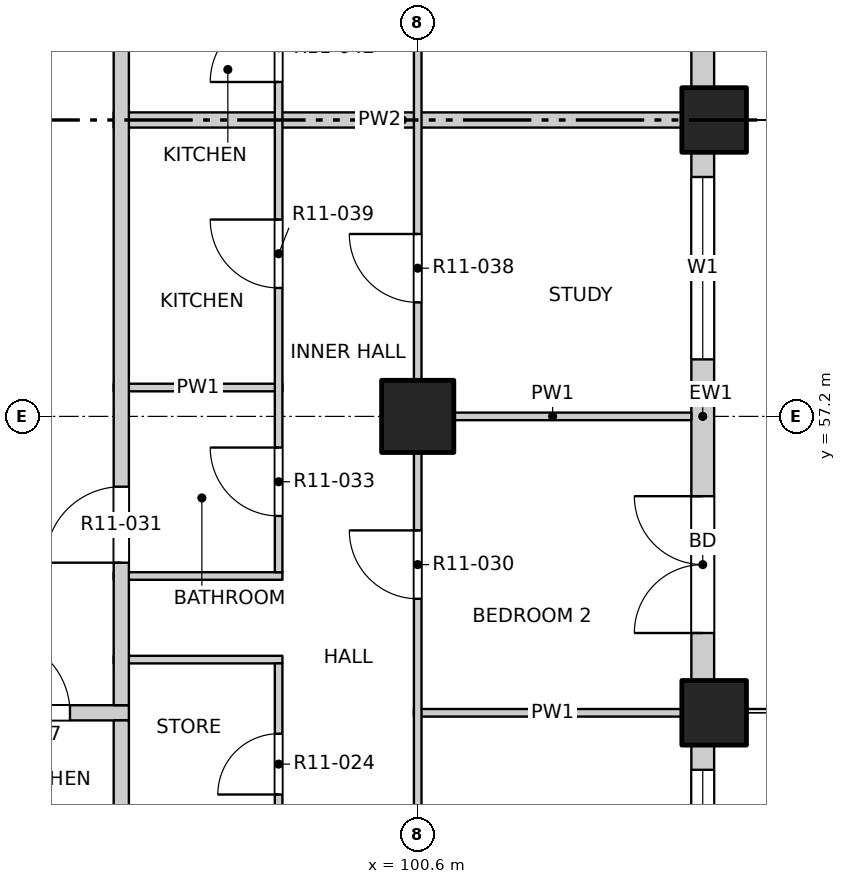
"""IFC4 building model, lengths in metres.
Left out: names, types, materials, properties, quantities, classifications, styles, units other than length and angle.
Written with IfcOpenShell. Run it as: python <this file> out.ifc"""

import sys

from ifc_helpers import new_model, si_unit, direction, frame, frame_2d, origin, origin_2d, place, context, subcontext, project, spatial, rectangle, extrude, element, fill, save


model = new_model("IFC4")
c1 = context("Model", 3, precision=1e-05, world=origin(), true_north=direction((0.0, 1.0)))
c2 = subcontext(c1, "Body", "Model", "MODEL_VIEW")
j1 = project(units=[si_unit("LENGTHUNIT", "METRE"), si_unit("PLANEANGLEUNIT", "RADIAN")], contexts=[c1])
p1 = place(None, origin())
s1 = spatial("IfcSite", under=j1, at=p1, CompositionType="ELEMENT")
p2 = place(p1, origin())
s2 = spatial("IfcBuilding", under=s1, at=p2, CompositionType="ELEMENT")
p3 = place(p2, frame((0.0, 0.0, 130.5)))
s3 = spatial("IfcBuildingStorey", under=s2, at=p3, CompositionType="ELEMENT", Elevation=130.5)
for number, where, z_axis, x_axis in (
    (1, (104.5, 53.3, -0.25), (0.0, 0.0, 1.0), (1.0, 0.0, 0.0)),
    (2, (104.5, 61.1, -0.25), (0.0, 0.0, 1.0), (1.0, 0.0, 0.0)),
):
    element("IfcColumn", number, at=place(p3, frame(where, z_axis=z_axis, x_axis=x_axis)), inside=s3, PredefinedType="COLUMN", context=c2, shape_type="SweptSolid", body=[
        extrude(rectangle(XDim=0.85, YDim=0.85, at=origin_2d()), origin(), (0.0, 0.0, 1.0), 3.4),
    ])
p4 = place(p3, frame((100.6, 57.2, -0.25), z_axis=(0.0, 0.0, 1.0), x_axis=(1.0, 0.0, 0.0)))
e3 = element("IfcColumn", 3, at=p4, inside=s3, PredefinedType="COLUMN", context=c2, shape_type="SweptSolid", body=[
    extrude(rectangle(XDim=0.95, YDim=0.95, at=origin_2d()), origin(), (0.0, 0.0, 1.0), 3.4),
])
p5 = place(p3, frame((104.35, 49.4, 0.0), z_axis=(0.0, 0.0, 1.0), x_axis=(0.0, 1.0, 0.0)))
e4 = element("IfcWall", 4, at=p5, inside=s3, PredefinedType="SOLIDWALL", context=c2, shape_type="SweptSolid", body=[
    extrude(rectangle(XDim=3.475, YDim=0.3, at=frame_2d((1.738, 0.0))), origin(), (0.0, 0.0, 1.0), 2.7),
])
p6 = place(p5, frame((0.75, 0.0, 0.9)))
e5 = element("IfcOpeningElement", 5, at=p6, cuts=e4, PredefinedType="OPENING", context=c2, shape_type="SweptSolid", body=[
    extrude(rectangle(XDim=2.4, YDim=1.8, at=frame_2d((1.2, 0.9))), frame((0.0, 0.16, 0.0), z_axis=(0.0, -1.0, 0.0), x_axis=(1.0, 0.0, 0.0)), (0.0, 0.0, 1.0), 0.32),
])
p7 = place(p3, frame((104.35, 53.725, 0.0), z_axis=(0.0, 0.0, 1.0), x_axis=(0.0, 1.0, 0.0)))
e6 = element("IfcWall", 6, at=p7, inside=s3, PredefinedType="SOLIDWALL", context=c2, shape_type="SweptSolid", body=[
    extrude(rectangle(XDim=6.95, YDim=0.3, at=frame_2d((3.475, 0.0))), origin(), (0.0, 0.0, 1.0), 2.7),
])
p8 = place(p7, frame((0.625, 0.0, 0.0)))
e7 = element("IfcOpeningElement", 7, at=p8, cuts=e6, PredefinedType="OPENING", context=c2, shape_type="SweptSolid", body=[
    extrude(rectangle(XDim=1.8, YDim=2.4, at=frame_2d((0.9, 1.2))), frame((0.0, 0.16, 0.0), z_axis=(0.0, -1.0, 0.0), x_axis=(1.0, 0.0, 0.0)), (0.0, 0.0, 1.0), 0.32),
])
p9 = place(p7, frame((4.225, 0.0, 0.9)))
e8 = element("IfcOpeningElement", 8, at=p9, cuts=e6, PredefinedType="OPENING", context=c2, shape_type="SweptSolid", body=[
    extrude(rectangle(XDim=2.4, YDim=1.8, at=frame_2d((1.2, 0.9))), frame((0.0, 0.16, 0.0), z_axis=(0.0, -1.0, 0.0), x_axis=(1.0, 0.0, 0.0)), (0.0, 0.0, 1.0), 0.32),
])
p10 = place(p3, frame((104.35, 61.525, 0.0), z_axis=(0.0, 0.0, 1.0), x_axis=(0.0, 1.0, 0.0)))
e9 = element("IfcWall", 9, at=p10, inside=s3, PredefinedType="SOLIDWALL", context=c2, shape_type="SweptSolid", body=[
    extrude(rectangle(XDim=6.95, YDim=0.3, at=frame_2d((3.475, 0.0))), origin(), (0.0, 0.0, 1.0), 2.7),
])
p11 = place(p10, frame((0.625, 0.0, 0.0)))
e10 = element("IfcOpeningElement", 10, at=p11, cuts=e9, PredefinedType="OPENING", context=c2, shape_type="SweptSolid", body=[
    extrude(rectangle(XDim=1.8, YDim=2.4, at=frame_2d((0.9, 1.2))), frame((0.0, 0.16, 0.0), z_axis=(0.0, -1.0, 0.0), x_axis=(1.0, 0.0, 0.0)), (0.0, 0.0, 1.0), 0.32),
])
p12 = place(p10, frame((4.225, 0.0, 0.9)))
e11 = element("IfcOpeningElement", 11, at=p12, cuts=e9, PredefinedType="OPENING", context=c2, shape_type="SweptSolid", body=[
    extrude(rectangle(XDim=2.4, YDim=1.8, at=frame_2d((1.2, 0.9))), frame((0.0, 0.16, 0.0), z_axis=(0.0, -1.0, 0.0), x_axis=(1.0, 0.0, 0.0)), (0.0, 0.0, 1.0), 0.32),
])
p13 = place(p3, frame((73.2, 53.3, 0.0), z_axis=(0.0, 0.0, 1.0), x_axis=(1.0, 0.0, 0.0)))
e12 = element("IfcWall", 12, at=p13, inside=s3, PredefinedType="PARTITIONING", context=c2, shape_type="SweptSolid", body=[
    extrude(rectangle(XDim=23.6, YDim=0.2, at=frame_2d((11.8, 0.0))), origin(), (0.0, 0.0, 1.0), 3.15),
])
p14 = place(p13, frame((6.775, 0.0, 0.0)))
e13 = element("IfcOpeningElement", 13, at=p14, cuts=e12, PredefinedType="OPENING", context=c2, shape_type="SweptSolid", body=[
    extrude(rectangle(XDim=1.0, YDim=2.1, at=frame_2d((0.5, 1.05))), frame((0.0, 0.11, 0.0), z_axis=(0.0, -1.0, 0.0), x_axis=(1.0, 0.0, 0.0)), (0.0, 0.0, 1.0), 0.22),
])
p15 = place(p13, frame((21.825, 0.0, 0.0)))
e14 = element("IfcOpeningElement", 14, at=p15, cuts=e12, PredefinedType="OPENING", context=c2, shape_type="SweptSolid", body=[
    extrude(rectangle(XDim=1.0, YDim=2.1, at=frame_2d((0.5, 1.05))), frame((0.0, 0.11, 0.0), z_axis=(0.0, -1.0, 0.0), x_axis=(1.0, 0.0, 0.0)), (0.0, 0.0, 1.0), 0.22),
])
p16 = place(p3, frame((100.55, 53.3, 0.0), z_axis=(0.0, 0.0, 1.0), x_axis=(1.0, 0.0, 0.0)))
e15 = element("IfcWall", 15, at=p16, inside=s3, PredefinedType="PARTITIONING", context=c2, shape_type="SweptSolid", body=[
    extrude(rectangle(XDim=3.65, YDim=0.1, at=frame_2d((1.825, 0.0))), origin(), (0.0, 0.0, 1.0), 3.15),
])
for number, where, z_axis, x_axis in (
    (16, (96.6, 54.0, 0.0), (0.0, 0.0, 1.0), (1.0, 0.0, 0.0)),
    (17, (96.6, 55.1, 0.0), (0.0, 0.0, 1.0), (1.0, 0.0, 0.0)),
):
    element("IfcWall", number, at=place(p3, frame(where, z_axis=z_axis, x_axis=x_axis)), inside=s3, PredefinedType="PARTITIONING", context=c2, shape_type="SweptSolid", body=[
        extrude(rectangle(XDim=2.22, YDim=0.1, at=frame_2d((1.11, 0.0))), origin(), (0.0, 0.0, 1.0), 3.15),
    ])
p17 = place(p3, frame((100.55, 57.2, 0.0), z_axis=(0.0, 0.0, 1.0), x_axis=(1.0, 0.0, 0.0)))
e18 = element("IfcWall", 18, at=p17, inside=s3, PredefinedType="PARTITIONING", context=c2, shape_type="SweptSolid", body=[
    extrude(rectangle(XDim=3.65, YDim=0.1, at=frame_2d((1.825, 0.0))), origin(), (0.0, 0.0, 1.0), 3.15),
])
p18 = place(p3, frame((96.6, 57.58, 0.0), z_axis=(0.0, 0.0, 1.0), x_axis=(1.0, 0.0, 0.0)))
e19 = element("IfcWall", 19, at=p18, inside=s3, PredefinedType="PARTITIONING", context=c2, shape_type="SweptSolid", body=[
    extrude(rectangle(XDim=2.22, YDim=0.1, at=frame_2d((1.11, 0.0))), origin(), (0.0, 0.0, 1.0), 3.15),
])
p19 = place(p3, frame((96.6, 61.1, 0.0), z_axis=(0.0, 0.0, 1.0), x_axis=(1.0, 0.0, 0.0)))
e20 = element("IfcWall", 20, at=p19, inside=s3, PredefinedType="PARTITIONING", context=c2, shape_type="SweptSolid", body=[
    extrude(rectangle(XDim=7.6, YDim=0.2, at=frame_2d((3.8, 0.0))), origin(), (0.0, 0.0, 1.0), 2.55),
])
p20 = place(p3, frame((96.7, 45.8, 0.0), z_axis=(0.0, 0.0, 1.0), x_axis=(0.0, 1.0, 0.0)))
e21 = element("IfcWall", 21, at=p20, inside=s3, PredefinedType="PARTITIONING", context=c2, shape_type="SweptSolid", body=[
    extrude(rectangle(XDim=7.4, YDim=0.2, at=frame_2d((3.7, 0.0))), origin(), (0.0, 0.0, 1.0), 3.15),
])
p21 = place(p3, frame((96.7, 53.4, 0.0), z_axis=(0.0, 0.0, 1.0), x_axis=(0.0, 1.0, 0.0)))
e22 = element("IfcWall", 22, at=p21, inside=s3, PredefinedType="PARTITIONING", context=c2, shape_type="SweptSolid", body=[
    extrude(rectangle(XDim=30.8, YDim=0.2, at=frame_2d((15.4, 0.0))), origin(), (0.0, 0.0, 1.0), 3.15),
])
p22 = place(p21, frame((1.875, 0.0, 0.0)))
e23 = element("IfcOpeningElement", 23, at=p22, cuts=e22, PredefinedType="OPENING", context=c2, shape_type="SweptSolid", body=[
    extrude(rectangle(XDim=1.0, YDim=2.1, at=frame_2d((0.5, 1.05))), frame((0.0, 0.11, 0.0), z_axis=(0.0, -1.0, 0.0), x_axis=(1.0, 0.0, 0.0)), (0.0, 0.0, 1.0), 0.22),
])
p23 = place(p21, frame((10.875, 0.0, 0.0)))
e24 = element("IfcOpeningElement", 24, at=p23, cuts=e22, PredefinedType="OPENING", context=c2, shape_type="SweptSolid", body=[
    extrude(rectangle(XDim=1.0, YDim=2.1, at=frame_2d((0.5, 1.05))), frame((0.0, 0.11, 0.0), z_axis=(0.0, -1.0, 0.0), x_axis=(1.0, 0.0, 0.0)), (0.0, 0.0, 1.0), 0.22),
])
p24 = place(p21, frame((25.725, 0.0, 0.0)))
e25 = element("IfcOpeningElement", 25, at=p24, cuts=e22, PredefinedType="OPENING", context=c2, shape_type="SweptSolid", body=[
    extrude(rectangle(XDim=1.0, YDim=2.1, at=frame_2d((0.5, 1.05))), frame((0.0, 0.11, 0.0), z_axis=(0.0, -1.0, 0.0), x_axis=(1.0, 0.0, 0.0)), (0.0, 0.0, 1.0), 0.22),
])
p25 = place(p3, frame((98.77, 49.45, 0.0), z_axis=(0.0, 0.0, 1.0), x_axis=(0.0, 1.0, 0.0)))
e26 = element("IfcWall", 26, at=p25, inside=s3, PredefinedType="PARTITIONING", context=c2, shape_type="SweptSolid", body=[
    extrude(rectangle(XDim=4.5, YDim=0.1, at=frame_2d((2.25, 0.0))), origin(), (0.0, 0.0, 1.0), 3.15),
])
p26 = place(p25, frame((0.425, 0.0, 0.0)))
e27 = element("IfcOpeningElement", 27, at=p26, cuts=e26, PredefinedType="OPENING", context=c2, shape_type="SweptSolid", body=[
    extrude(rectangle(XDim=0.9, YDim=2.1, at=frame_2d((0.45, 1.05))), frame((0.0, 0.06, 0.0), z_axis=(0.0, -1.0, 0.0), x_axis=(1.0, 0.0, 0.0)), (0.0, 0.0, 1.0), 0.12),
])
p27 = place(p25, frame((2.775, 0.0, 0.0)))
e28 = element("IfcOpeningElement", 28, at=p27, cuts=e26, PredefinedType="OPENING", context=c2, shape_type="SweptSolid", body=[
    extrude(rectangle(XDim=0.8, YDim=2.1, at=frame_2d((0.4, 1.05))), frame((0.0, 0.06, 0.0), z_axis=(0.0, -1.0, 0.0), x_axis=(1.0, 0.0, 0.0)), (0.0, 0.0, 1.0), 0.12),
])
p28 = place(p3, frame((98.77, 55.15, 0.0), z_axis=(0.0, 0.0, 1.0), x_axis=(0.0, 1.0, 0.0)))
e29 = element("IfcWall", 29, at=p28, inside=s3, PredefinedType="PARTITIONING", context=c2, shape_type="SweptSolid", body=[
    extrude(rectangle(XDim=7.8, YDim=0.1, at=frame_2d((3.9, 0.0))), origin(), (0.0, 0.0, 1.0), 3.15),
])
p29 = place(p28, frame((0.74, 0.0, 0.0)))
e30 = element("IfcOpeningElement", 30, at=p29, cuts=e29, PredefinedType="OPENING", context=c2, shape_type="SweptSolid", body=[
    extrude(rectangle(XDim=0.9, YDim=2.1, at=frame_2d((0.45, 1.05))), frame((0.0, 0.06, 0.0), z_axis=(0.0, -1.0, 0.0), x_axis=(1.0, 0.0, 0.0)), (0.0, 0.0, 1.0), 0.12),
])
p30 = place(p28, frame((3.74, 0.0, 0.0)))
e31 = element("IfcOpeningElement", 31, at=p30, cuts=e29, PredefinedType="OPENING", context=c2, shape_type="SweptSolid", body=[
    extrude(rectangle(XDim=0.9, YDim=2.1, at=frame_2d((0.45, 1.05))), frame((0.0, 0.06, 0.0), z_axis=(0.0, -1.0, 0.0), x_axis=(1.0, 0.0, 0.0)), (0.0, 0.0, 1.0), 0.12),
])
p31 = place(p28, frame((6.45, 0.0, 0.0)))
e32 = element("IfcOpeningElement", 32, at=p31, cuts=e29, PredefinedType="OPENING", context=c2, shape_type="SweptSolid", body=[
    extrude(rectangle(XDim=0.9, YDim=2.1, at=frame_2d((0.45, 1.05))), frame((0.0, 0.06, 0.0), z_axis=(0.0, -1.0, 0.0), x_axis=(1.0, 0.0, 0.0)), (0.0, 0.0, 1.0), 0.12),
])
p32 = place(p3, frame((100.6, 45.8, 0.0), z_axis=(0.0, 0.0, 1.0), x_axis=(0.0, 1.0, 0.0)))
e33 = element("IfcWall", 33, at=p32, inside=s3, PredefinedType="PARTITIONING", context=c2, shape_type="SweptSolid", body=[
    extrude(rectangle(XDim=38.4, YDim=0.1, at=frame_2d((19.2, 0.0))), origin(), (0.0, 0.0, 1.0), 3.15),
])
p33 = place(p32, frame((1.05, 0.0, 0.0)))
e34 = element("IfcOpeningElement", 34, at=p33, cuts=e33, PredefinedType="OPENING", context=c2, shape_type="SweptSolid", body=[
    extrude(rectangle(XDim=1.2, YDim=2.1, at=frame_2d((0.6, 1.05))), frame((0.0, 0.06, 0.0), z_axis=(0.0, -1.0, 0.0), x_axis=(1.0, 0.0, 0.0)), (0.0, 0.0, 1.0), 0.12),
])
p34 = place(p32, frame((5.1, 0.0, 0.0)))
e35 = element("IfcOpeningElement", 35, at=p34, cuts=e33, PredefinedType="OPENING", context=c2, shape_type="SweptSolid", body=[
    extrude(rectangle(XDim=0.9, YDim=2.1, at=frame_2d((0.45, 1.05))), frame((0.0, 0.06, 0.0), z_axis=(0.0, -1.0, 0.0), x_axis=(1.0, 0.0, 0.0)), (0.0, 0.0, 1.0), 0.12),
])
p35 = place(p32, frame((9.0, 0.0, 0.0)))
e36 = element("IfcOpeningElement", 36, at=p35, cuts=e33, PredefinedType="OPENING", context=c2, shape_type="SweptSolid", body=[
    extrude(rectangle(XDim=0.9, YDim=2.1, at=frame_2d((0.45, 1.05))), frame((0.0, 0.06, 0.0), z_axis=(0.0, -1.0, 0.0), x_axis=(1.0, 0.0, 0.0)), (0.0, 0.0, 1.0), 0.12),
])
p36 = place(p32, frame((12.9, 0.0, 0.0)))
e37 = element("IfcOpeningElement", 37, at=p36, cuts=e33, PredefinedType="OPENING", context=c2, shape_type="SweptSolid", body=[
    extrude(rectangle(XDim=0.9, YDim=2.1, at=frame_2d((0.45, 1.05))), frame((0.0, 0.06, 0.0), z_axis=(0.0, -1.0, 0.0), x_axis=(1.0, 0.0, 0.0)), (0.0, 0.0, 1.0), 0.12),
])
p37 = place(p32, frame((16.8, 0.0, 0.0)))
e38 = element("IfcOpeningElement", 38, at=p37, cuts=e33, PredefinedType="OPENING", context=c2, shape_type="SweptSolid", body=[
    extrude(rectangle(XDim=0.9, YDim=2.1, at=frame_2d((0.45, 1.05))), frame((0.0, 0.06, 0.0), z_axis=(0.0, -1.0, 0.0), x_axis=(1.0, 0.0, 0.0)), (0.0, 0.0, 1.0), 0.12),
])
p38 = place(p32, frame((20.7, 0.0, 0.0)))
e39 = element("IfcOpeningElement", 39, at=p38, cuts=e33, PredefinedType="OPENING", context=c2, shape_type="SweptSolid", body=[
    extrude(rectangle(XDim=0.9, YDim=2.1, at=frame_2d((0.45, 1.05))), frame((0.0, 0.06, 0.0), z_axis=(0.0, -1.0, 0.0), x_axis=(1.0, 0.0, 0.0)), (0.0, 0.0, 1.0), 0.12),
])
p39 = place(p32, frame((24.6, 0.0, 0.0)))
e40 = element("IfcOpeningElement", 40, at=p39, cuts=e33, PredefinedType="OPENING", context=c2, shape_type="SweptSolid", body=[
    extrude(rectangle(XDim=0.9, YDim=2.1, at=frame_2d((0.45, 1.05))), frame((0.0, 0.06, 0.0), z_axis=(0.0, -1.0, 0.0), x_axis=(1.0, 0.0, 0.0)), (0.0, 0.0, 1.0), 0.12),
])
p40 = place(p32, frame((30.3, 0.0, 0.0)))
e41 = element("IfcOpeningElement", 41, at=p40, cuts=e33, PredefinedType="OPENING", context=c2, shape_type="SweptSolid", body=[
    extrude(rectangle(XDim=1.2, YDim=2.1, at=frame_2d((0.6, 1.05))), frame((0.0, 0.06, 0.0), z_axis=(0.0, -1.0, 0.0), x_axis=(1.0, 0.0, 0.0)), (0.0, 0.0, 1.0), 0.12),
])
p41 = place(p32, frame((36.15, 0.0, 0.0)))
e42 = element("IfcOpeningElement", 42, at=p41, cuts=e33, PredefinedType="OPENING", context=c2, shape_type="SweptSolid", body=[
    extrude(rectangle(XDim=1.2, YDim=2.1, at=frame_2d((0.6, 1.05))), frame((0.0, 0.06, 0.0), z_axis=(0.0, -1.0, 0.0), x_axis=(1.0, 0.0, 0.0)), (0.0, 0.0, 1.0), 0.12),
])
p42 = place(p6, origin())
e43 = element("IfcWindow", 43, at=p42, inside=s3, PartitioningType="DOUBLE_PANEL_VERTICAL", PredefinedType="WINDOW", context=c2, shape_type="SweptSolid", body=[
    extrude(rectangle(XDim=2.4, YDim=1.8, at=frame_2d((1.2, 0.9))), frame((0.0, 0.03, 0.0), z_axis=(0.0, -1.0, 0.0), x_axis=(1.0, 0.0, 0.0)), (0.0, 0.0, 1.0), 0.06),
])
fill(e5, e43)
p43 = place(p8, origin())
e44 = element("IfcDoor", 44, at=p43, inside=s3, OperationType="DOUBLE_DOOR_SINGLE_SWING", PredefinedType="DOOR", context=c2, shape_type="SweptSolid", body=[
    extrude(rectangle(XDim=1.8, YDim=2.4, at=frame_2d((0.9, 1.2))), frame((0.0, 0.025, 0.0), z_axis=(0.0, -1.0, 0.0), x_axis=(1.0, 0.0, 0.0)), (0.0, 0.0, 1.0), 0.05),
])
fill(e7, e44)
p44 = place(p9, origin())
e45 = element("IfcWindow", 45, at=p44, inside=s3, PartitioningType="DOUBLE_PANEL_VERTICAL", PredefinedType="WINDOW", context=c2, shape_type="SweptSolid", body=[
    extrude(rectangle(XDim=2.4, YDim=1.8, at=frame_2d((1.2, 0.9))), frame((0.0, 0.03, 0.0), z_axis=(0.0, -1.0, 0.0), x_axis=(1.0, 0.0, 0.0)), (0.0, 0.0, 1.0), 0.06),
])
fill(e8, e45)
p45 = place(p27, origin())
e46 = element("IfcDoor", 46, at=p45, inside=s3, OperationType="SINGLE_SWING_LEFT", PredefinedType="DOOR", context=c2, shape_type="SweptSolid", body=[
    extrude(rectangle(XDim=0.8, YDim=2.1, at=frame_2d((0.4, 1.05))), frame((0.0, 0.025, 0.0), z_axis=(0.0, -1.0, 0.0), x_axis=(1.0, 0.0, 0.0)), (0.0, 0.0, 1.0), 0.05),
])
fill(e28, e46)
p46 = place(p15, origin())
e47 = element("IfcDoor", 47, at=p46, inside=s3, OperationType="SINGLE_SWING_LEFT", PredefinedType="DOOR", context=c2, shape_type="SweptSolid", body=[
    extrude(rectangle(XDim=1.0, YDim=2.1, at=frame_2d((0.5, 1.05))), frame((0.0, 0.025, 0.0), z_axis=(0.0, -1.0, 0.0), x_axis=(1.0, 0.0, 0.0)), (0.0, 0.0, 1.0), 0.05),
])
fill(e14, e47)
p47 = place(p35, origin())
e48 = element("IfcDoor", 48, at=p47, inside=s3, OperationType="SINGLE_SWING_RIGHT", PredefinedType="DOOR", context=c2, shape_type="SweptSolid", body=[
    extrude(rectangle(XDim=0.9, YDim=2.1, at=frame_2d((0.45, 1.05))), frame((0.0, 0.025, 0.0), z_axis=(0.0, -1.0, 0.0), x_axis=(1.0, 0.0, 0.0)), (0.0, 0.0, 1.0), 0.05),
])
fill(e36, e48)
p48 = place(p22, origin())
e49 = element("IfcDoor", 49, at=p48, inside=s3, OperationType="SINGLE_SWING_LEFT", PredefinedType="DOOR", context=c2, shape_type="SweptSolid", body=[
    extrude(rectangle(XDim=1.0, YDim=2.1, at=frame_2d((0.5, 1.05))), frame((0.0, 0.025, 0.0), z_axis=(0.0, -1.0, 0.0), x_axis=(1.0, 0.0, 0.0)), (0.0, 0.0, 1.0), 0.05),
])
fill(e23, e49)
p49 = place(p29, origin())
e50 = element("IfcDoor", 50, at=p49, inside=s3, OperationType="SINGLE_SWING_RIGHT", PredefinedType="DOOR", context=c2, shape_type="SweptSolid", body=[
    extrude(rectangle(XDim=0.9, YDim=2.1, at=frame_2d((0.45, 1.05))), frame((0.0, 0.025, 0.0), z_axis=(0.0, -1.0, 0.0), x_axis=(1.0, 0.0, 0.0)), (0.0, 0.0, 1.0), 0.05),
])
fill(e30, e50)
p50 = place(p36, origin())
e51 = element("IfcDoor", 51, at=p50, inside=s3, OperationType="SINGLE_SWING_RIGHT", PredefinedType="DOOR", context=c2, shape_type="SweptSolid", body=[
    extrude(rectangle(XDim=0.9, YDim=2.1, at=frame_2d((0.45, 1.05))), frame((0.0, 0.025, 0.0), z_axis=(0.0, -1.0, 0.0), x_axis=(1.0, 0.0, 0.0)), (0.0, 0.0, 1.0), 0.05),
])
fill(e37, e51)
p51 = place(p30, origin())
e52 = element("IfcDoor", 52, at=p51, inside=s3, OperationType="SINGLE_SWING_RIGHT", PredefinedType="DOOR", context=c2, shape_type="SweptSolid", body=[
    extrude(rectangle(XDim=0.9, YDim=2.1, at=frame_2d((0.45, 1.05))), frame((0.0, 0.025, 0.0), z_axis=(0.0, -1.0, 0.0), x_axis=(1.0, 0.0, 0.0)), (0.0, 0.0, 1.0), 0.05),
])
fill(e31, e52)
p52 = place(p31, origin())
e53 = element("IfcDoor", 53, at=p52, inside=s3, OperationType="SINGLE_SWING_LEFT", PredefinedType="DOOR", context=c2, shape_type="SweptSolid", body=[
    extrude(rectangle(XDim=0.9, YDim=2.1, at=frame_2d((0.45, 1.05))), frame((0.0, 0.025, 0.0), z_axis=(0.0, -1.0, 0.0), x_axis=(1.0, 0.0, 0.0)), (0.0, 0.0, 1.0), 0.05),
])
fill(e32, e53)
save(model, sys.argv[1])
